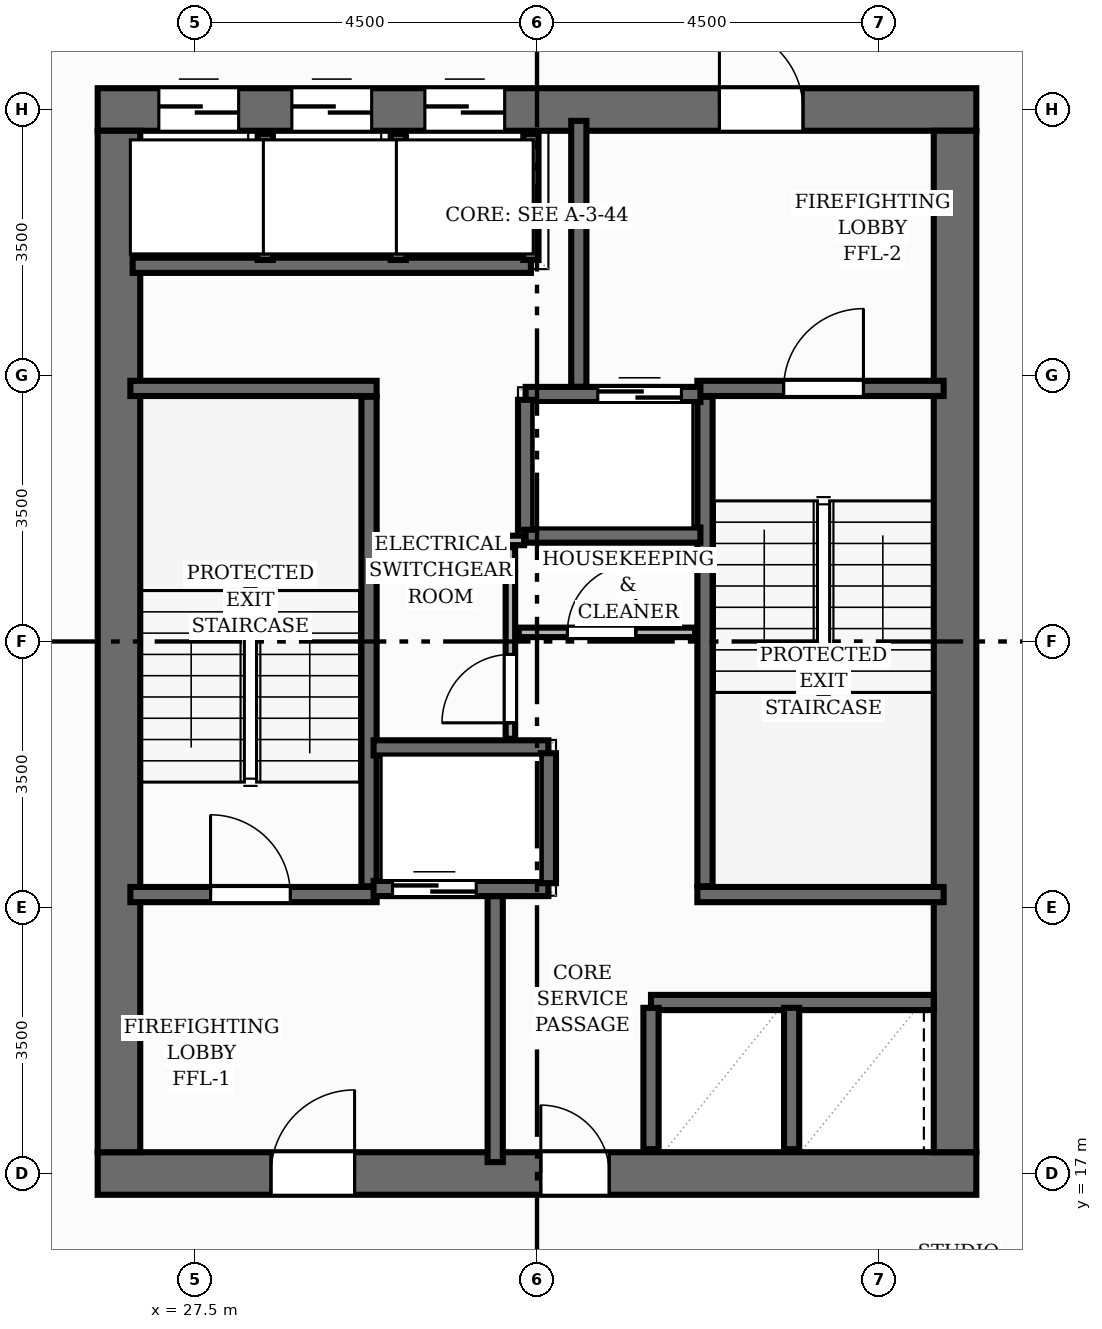
"""IFC4 building model, lengths in metres.
Left out: names, types, materials, properties, quantities, classifications, styles, units other than length and angle.
Written with IfcOpenShell. Run it as: python <this file> out.ifc"""

import sys

from ifc_helpers import new_model, si_unit, direction, frame, frame_2d, origin, place, context, subcontext, project, spatial, rectangle, extrude, element, fill, save


model = new_model("IFC4")
c1 = context("Model", 3, precision=1e-05, world=origin(), true_north=direction((0.0, 1.0)))
c2 = subcontext(c1, "Body", "Model", "MODEL_VIEW")
j1 = project(units=[si_unit("LENGTHUNIT", "METRE"), si_unit("PLANEANGLEUNIT", "RADIAN")], contexts=[c1])
p1 = place(None, origin())
s1 = spatial("IfcSite", under=j1, at=p1, CompositionType="ELEMENT")
p2 = place(p1, origin())
s2 = spatial("IfcBuilding", under=s1, at=p2, CompositionType="ELEMENT")
p3 = place(p2, frame((0.0, 0.0, 182.24)))
s3 = spatial("IfcBuildingStorey", under=s2, at=p3, CompositionType="ELEMENT", Elevation=182.24)
p4 = place(p3, frame((26.22, 17.0, 0.0), z_axis=(0.0, 0.0, 1.0), x_axis=(1.0, 0.0, 0.0)))
e1 = element("IfcWall", 1, at=p4, inside=s3, PredefinedType="SHEAR", context=c2, shape_type="SweptSolid", body=[
    extrude(rectangle(XDim=11.56, YDim=0.56, at=frame_2d((5.78, 0.0))), origin(), (0.0, 0.0, 1.0), 3.2),
])
p5 = place(p4, frame((2.28, 0.0, 0.0)))
e2 = element("IfcOpeningElement", 2, at=p5, cuts=e1, PredefinedType="OPENING", context=c2, shape_type="SweptSolid", body=[
    extrude(rectangle(XDim=1.1, YDim=2.15, at=frame_2d((0.55, 1.075))), frame((0.0, 0.29, 0.0), z_axis=(0.0, -1.0, 0.0), x_axis=(1.0, 0.0, 0.0)), (0.0, 0.0, 1.0), 0.58),
])
p6 = place(p4, frame((5.83, 0.0, 0.0)))
e3 = element("IfcOpeningElement", 3, at=p6, cuts=e1, PredefinedType="OPENING", context=c2, shape_type="SweptSolid", body=[
    extrude(rectangle(XDim=0.9, YDim=2.1, at=frame_2d((0.45, 1.05))), frame((0.0, 0.29, 0.0), z_axis=(0.0, -1.0, 0.0), x_axis=(1.0, 0.0, 0.0)), (0.0, 0.0, 1.0), 0.58),
])
p7 = place(p3, frame((26.22, 31.0, 0.0), z_axis=(0.0, 0.0, 1.0), x_axis=(1.0, 0.0, 0.0)))
e4 = element("IfcWall", 4, at=p7, inside=s3, PredefinedType="SHEAR", context=c2, shape_type="SweptSolid", body=[
    extrude(rectangle(XDim=11.56, YDim=0.56, at=frame_2d((5.78, 0.0))), origin(), (0.0, 0.0, 1.0), 3.2),
])
p8 = place(p7, frame((8.18, 0.0, 0.0)))
e5 = element("IfcOpeningElement", 5, at=p8, cuts=e4, PredefinedType="OPENING", context=c2, shape_type="SweptSolid", body=[
    extrude(rectangle(XDim=1.1, YDim=2.15, at=frame_2d((0.55, 1.075))), frame((0.0, 0.29, 0.0), z_axis=(0.0, -1.0, 0.0), x_axis=(1.0, 0.0, 0.0)), (0.0, 0.0, 1.0), 0.58),
])
p9 = place(p7, frame((0.805, 0.0, 0.0)))
e6 = element("IfcOpeningElement", 6, at=p9, cuts=e4, PredefinedType="OPENING", context=c2, shape_type="SweptSolid", body=[
    extrude(rectangle(XDim=1.05, YDim=2.15, at=frame_2d((0.525, 1.075))), frame((0.0, 0.29, 0.0), z_axis=(0.0, -1.0, 0.0), x_axis=(1.0, 0.0, 0.0)), (0.0, 0.0, 1.0), 0.58),
])
p10 = place(p7, frame((2.555, 0.0, 0.0)))
e7 = element("IfcOpeningElement", 7, at=p10, cuts=e4, PredefinedType="OPENING", context=c2, shape_type="SweptSolid", body=[
    extrude(rectangle(XDim=1.05, YDim=2.15, at=frame_2d((0.525, 1.075))), frame((0.0, 0.29, 0.0), z_axis=(0.0, -1.0, 0.0), x_axis=(1.0, 0.0, 0.0)), (0.0, 0.0, 1.0), 0.58),
])
p11 = place(p7, frame((4.305, 0.0, 0.0)))
e8 = element("IfcOpeningElement", 8, at=p11, cuts=e4, PredefinedType="OPENING", context=c2, shape_type="SweptSolid", body=[
    extrude(rectangle(XDim=1.05, YDim=2.15, at=frame_2d((0.525, 1.075))), frame((0.0, 0.29, 0.0), z_axis=(0.0, -1.0, 0.0), x_axis=(1.0, 0.0, 0.0)), (0.0, 0.0, 1.0), 0.58),
])
for number, where, z_axis, x_axis in (
    (9, (26.5, 17.28, 0.0), (0.0, 0.0, 1.0), (0.0, 1.0, 0.0)),
    (10, (37.5, 17.28, 0.0), (0.0, 0.0, 1.0), (0.0, 1.0, 0.0)),
):
    element("IfcWall", number, at=place(p3, frame(where, z_axis=z_axis, x_axis=x_axis)), inside=s3, PredefinedType="SHEAR", context=c2, shape_type="SweptSolid", body=[
        extrude(rectangle(XDim=13.44, YDim=0.56, at=frame_2d((6.72, 0.0))), origin(), (0.0, 0.0, 1.0), 3.2),
    ])
p12 = place(p3, frame((29.79, 20.78, 0.0), z_axis=(0.0, 0.0, 1.0), x_axis=(0.0, 1.0, 0.0)))
e11 = element("IfcWall", 11, at=p12, inside=s3, PredefinedType="SHEAR", context=c2, shape_type="SweptSolid", body=[
    extrude(rectangle(XDim=6.44, YDim=0.2, at=frame_2d((3.22, 0.0))), origin(), (0.0, 0.0, 1.0), 3.2),
])
p13 = place(p3, frame((26.65, 27.33, 0.0), z_axis=(0.0, 0.0, 1.0), x_axis=(1.0, 0.0, 0.0)))
e12 = element("IfcWall", 12, at=p13, inside=s3, PredefinedType="SHEAR", context=c2, shape_type="SweptSolid", body=[
    extrude(rectangle(XDim=3.24, YDim=0.2, at=frame_2d((1.62, 0.0))), origin(), (0.0, 0.0, 1.0), 3.2),
])
p14 = place(p3, frame((26.65, 20.67, 0.0), z_axis=(0.0, 0.0, 1.0), x_axis=(1.0, 0.0, 0.0)))
e13 = element("IfcWall", 13, at=p14, inside=s3, PredefinedType="SHEAR", context=c2, shape_type="SweptSolid", body=[
    extrude(rectangle(XDim=3.24, YDim=0.2, at=frame_2d((1.62, 0.0))), origin(), (0.0, 0.0, 1.0), 3.2),
])
p15 = place(p14, frame((1.055, 0.0, 0.0)))
e14 = element("IfcOpeningElement", 14, at=p15, cuts=e13, PredefinedType="OPENING", context=c2, shape_type="SweptSolid", body=[
    extrude(rectangle(XDim=1.05, YDim=2.15, at=frame_2d((0.525, 1.075))), frame((0.0, 0.11, 0.0), z_axis=(0.0, -1.0, 0.0), x_axis=(1.0, 0.0, 0.0)), (0.0, 0.0, 1.0), 0.22),
])
p16 = place(p3, frame((34.21, 20.78, 0.0), z_axis=(0.0, 0.0, 1.0), x_axis=(0.0, 1.0, 0.0)))
e15 = element("IfcWall", 15, at=p16, inside=s3, PredefinedType="SHEAR", context=c2, shape_type="SweptSolid", body=[
    extrude(rectangle(XDim=6.44, YDim=0.2, at=frame_2d((3.22, 0.0))), origin(), (0.0, 0.0, 1.0), 3.2),
])
p17 = place(p3, frame((34.11, 20.67, 0.0), z_axis=(0.0, 0.0, 1.0), x_axis=(1.0, 0.0, 0.0)))
e16 = element("IfcWall", 16, at=p17, inside=s3, PredefinedType="SHEAR", context=c2, shape_type="SweptSolid", body=[
    extrude(rectangle(XDim=3.24, YDim=0.2, at=frame_2d((1.62, 0.0))), origin(), (0.0, 0.0, 1.0), 3.2),
])
p18 = place(p3, frame((34.11, 27.33, 0.0), z_axis=(0.0, 0.0, 1.0), x_axis=(1.0, 0.0, 0.0)))
e17 = element("IfcWall", 17, at=p18, inside=s3, PredefinedType="SHEAR", context=c2, shape_type="SweptSolid", body=[
    extrude(rectangle(XDim=3.24, YDim=0.2, at=frame_2d((1.62, 0.0))), origin(), (0.0, 0.0, 1.0), 3.2),
])
p19 = place(p18, frame((1.135, 0.0, 0.0)))
e18 = element("IfcOpeningElement", 18, at=p19, cuts=e17, PredefinedType="OPENING", context=c2, shape_type="SweptSolid", body=[
    extrude(rectangle(XDim=1.05, YDim=2.15, at=frame_2d((0.525, 1.075))), frame((0.0, 0.11, 0.0), z_axis=(0.0, -1.0, 0.0), x_axis=(1.0, 0.0, 0.0)), (0.0, 0.0, 1.0), 0.22),
])
for number, where, z_axis, x_axis in (
    (19, (31.45, 17.15, 0.0), (0.0, 0.0, 1.0), (0.0, 1.0, 0.0)),
    (20, (32.55, 27.35, 0.0), (0.0, 0.0, 1.0), (0.0, 1.0, 0.0)),
):
    element("IfcWall", number, at=place(p3, frame(where, z_axis=z_axis, x_axis=x_axis)), inside=s3, PredefinedType="SHEAR", context=c2, shape_type="SweptSolid", body=[
        extrude(rectangle(XDim=3.5, YDim=0.2, at=frame_2d((1.75, 0.0))), origin(), (0.0, 0.0, 1.0), 3.2),
    ])
p20 = place(p3, frame((29.85, 20.75, 0.0), z_axis=(0.0, 0.0, 1.0), x_axis=(1.0, 0.0, 0.0)))
e21 = element("IfcWall", 21, at=p20, inside=s3, PredefinedType="SHEAR", context=c2, shape_type="SweptSolid", body=[
    extrude(rectangle(XDim=2.3, YDim=0.2, at=frame_2d((1.15, 0.0))), origin(), (0.0, 0.0, 1.0), 3.2),
])
p21 = place(p20, frame((0.25, 0.0, 0.0)))
e22 = element("IfcOpeningElement", 22, at=p21, cuts=e21, PredefinedType="OPENING", context=c2, shape_type="SweptSolid", body=[
    extrude(rectangle(XDim=1.1, YDim=2.15, at=frame_2d((0.55, 1.075))), frame((0.0, 0.11, 0.0), z_axis=(0.0, -1.0, 0.0), x_axis=(1.0, 0.0, 0.0)), (0.0, 0.0, 1.0), 0.22),
])
p22 = place(p3, frame((29.85, 22.6, 0.0), z_axis=(0.0, 0.0, 1.0), x_axis=(1.0, 0.0, 0.0)))
e23 = element("IfcWall", 23, at=p22, inside=s3, PredefinedType="SHEAR", context=c2, shape_type="SweptSolid", body=[
    extrude(rectangle(XDim=2.3, YDim=0.2, at=frame_2d((1.15, 0.0))), origin(), (0.0, 0.0, 1.0), 3.2),
])
p23 = place(p3, frame((32.15, 20.82, 0.0), z_axis=(0.0, 0.0, 1.0), x_axis=(0.0, 1.0, 0.0)))
e24 = element("IfcWall", 24, at=p23, inside=s3, PredefinedType="SHEAR", context=c2, shape_type="SweptSolid", body=[
    extrude(rectangle(XDim=1.71, YDim=0.2, at=frame_2d((0.855, 0.0))), origin(), (0.0, 0.0, 1.0), 3.2),
])
p24 = place(p3, frame((31.85, 27.25, 0.0), z_axis=(0.0, 0.0, 1.0), x_axis=(1.0, 0.0, 0.0)))
e25 = element("IfcWall", 25, at=p24, inside=s3, PredefinedType="SHEAR", context=c2, shape_type="SweptSolid", body=[
    extrude(rectangle(XDim=2.3, YDim=0.2, at=frame_2d((1.15, 0.0))), origin(), (0.0, 0.0, 1.0), 3.2),
])
p25 = place(p24, frame((0.95, 0.0, 0.0)))
e26 = element("IfcOpeningElement", 26, at=p25, cuts=e25, PredefinedType="OPENING", context=c2, shape_type="SweptSolid", body=[
    extrude(rectangle(XDim=1.1, YDim=2.15, at=frame_2d((0.55, 1.075))), frame((0.0, 0.11, 0.0), z_axis=(0.0, -1.0, 0.0), x_axis=(1.0, 0.0, 0.0)), (0.0, 0.0, 1.0), 0.22),
])
p26 = place(p3, frame((31.85, 25.4, 0.0), z_axis=(0.0, 0.0, 1.0), x_axis=(1.0, 0.0, 0.0)))
e27 = element("IfcWall", 27, at=p26, inside=s3, PredefinedType="SHEAR", context=c2, shape_type="SweptSolid", body=[
    extrude(rectangle(XDim=2.3, YDim=0.2, at=frame_2d((1.15, 0.0))), origin(), (0.0, 0.0, 1.0), 3.2),
])
p27 = place(p3, frame((31.85, 25.47, 0.0), z_axis=(0.0, 0.0, 1.0), x_axis=(0.0, 1.0, 0.0)))
e28 = element("IfcWall", 28, at=p27, inside=s3, PredefinedType="SHEAR", context=c2, shape_type="SweptSolid", body=[
    extrude(rectangle(XDim=1.71, YDim=0.2, at=frame_2d((0.855, 0.0))), origin(), (0.0, 0.0, 1.0), 3.2),
])
p28 = place(p3, frame((26.68, 28.95, 0.0), z_axis=(0.0, 0.0, 1.0), x_axis=(1.0, 0.0, 0.0)))
e29 = element("IfcWall", 29, at=p28, inside=s3, PredefinedType="SHEAR", context=c2, shape_type="SweptSolid", body=[
    extrude(rectangle(XDim=5.24, YDim=0.2, at=frame_2d((2.62, 0.0))), origin(), (0.0, 0.0, 1.0), 3.2),
])
for number, where, z_axis, x_axis in (
    (30, (31.92, 29.02, 0.0), (0.0, 0.0, 1.0), (0.0, 1.0, 0.0)),
    (31, (28.425, 29.02, 0.0), (0.0, 0.0, 1.0), (0.0, 1.0, 0.0)),
    (32, (30.175, 29.02, 0.0), (0.0, 0.0, 1.0), (0.0, 1.0, 0.0)),
):
    element("IfcWall", number, at=place(p3, frame(where, z_axis=z_axis, x_axis=x_axis)), inside=s3, PredefinedType="SHEAR", context=c2, shape_type="SweptSolid", body=[
        extrude(rectangle(XDim=1.66, YDim=0.2, at=frame_2d((0.83, 0.0))), origin(), (0.0, 0.0, 1.0), 3.2),
    ])
p29 = place(p3, frame((33.5, 19.25, 0.0), z_axis=(0.0, 0.0, 1.0), x_axis=(1.0, 0.0, 0.0)))
e33 = element("IfcWall", 33, at=p29, inside=s3, PredefinedType="SHEAR", context=c2, shape_type="SweptSolid", body=[
    extrude(rectangle(XDim=3.72, YDim=0.2, at=frame_2d((1.86, 0.0))), origin(), (0.0, 0.0, 1.0), 3.2),
])
for number, where, z_axis, x_axis in (
    (34, (33.5, 17.32, 0.0), (0.0, 0.0, 1.0), (0.0, 1.0, 0.0)),
    (35, (35.35, 17.32, 0.0), (0.0, 0.0, 1.0), (0.0, 1.0, 0.0)),
):
    element("IfcWall", number, at=place(p3, frame(where, z_axis=z_axis, x_axis=x_axis)), inside=s3, PredefinedType="SHEAR", context=c2, shape_type="SweptSolid", body=[
        extrude(rectangle(XDim=1.86, YDim=0.2, at=frame_2d((0.93, 0.0))), origin(), (0.0, 0.0, 1.0), 3.2),
    ])
p30 = place(p3, frame((31.65, 22.72, 0.0), z_axis=(0.0, 0.0, 1.0), x_axis=(0.0, 1.0, 0.0)))
e36 = element("IfcWall", 36, at=p30, inside=s3, PredefinedType="PARTITIONING", context=c2, shape_type="SweptSolid", body=[
    extrude(rectangle(XDim=2.52, YDim=0.125, at=frame_2d((1.26, 0.0))), origin(), (0.0, 0.0, 1.0), 2.955),
])
p31 = place(p30, frame((0.21, 0.0, 0.0)))
e37 = element("IfcOpeningElement", 37, at=p31, cuts=e36, PredefinedType="OPENING", context=c2, shape_type="SweptSolid", body=[
    extrude(rectangle(XDim=0.9, YDim=2.1, at=frame_2d((0.45, 1.05))), frame((0.0, 0.073, 0.0), z_axis=(0.0, -1.0, 0.0), x_axis=(1.0, 0.0, 0.0)), (0.0, 0.0, 1.0), 0.145),
])
p32 = place(p3, frame((31.76, 24.12, 0.0), z_axis=(0.0, 0.0, 1.0), x_axis=(1.0, 0.0, 0.0)))
e38 = element("IfcWall", 38, at=p32, inside=s3, PredefinedType="PARTITIONING", context=c2, shape_type="SweptSolid", body=[
    extrude(rectangle(XDim=2.32, YDim=0.125, at=frame_2d((1.16, 0.0))), origin(), (0.0, 0.0, 1.0), 2.955),
])
p33 = place(p32, frame((0.64, 0.0, 0.0)))
e39 = element("IfcOpeningElement", 39, at=p33, cuts=e38, PredefinedType="OPENING", context=c2, shape_type="SweptSolid", body=[
    extrude(rectangle(XDim=0.9, YDim=2.1, at=frame_2d((0.45, 1.05))), frame((0.0, 0.073, 0.0), z_axis=(0.0, -1.0, 0.0), x_axis=(1.0, 0.0, 0.0)), (0.0, 0.0, 1.0), 0.145),
])
p34 = place(p3, frame((29.89, 25.33, 0.0), z_axis=(0.0, 0.0, 1.0), x_axis=(1.0, 0.0, 0.0)))
e40 = element("IfcWall", 40, at=p34, inside=s3, PredefinedType="PARTITIONING", context=c2, shape_type="SweptSolid", body=[
    extrude(rectangle(XDim=1.94, YDim=0.125, at=frame_2d((0.97, 0.0))), origin(), (0.0, 0.0, 1.0), 2.955),
])
p35 = place(p15, origin())
e41 = element("IfcDoor", 41, at=p35, inside=s3, OperationType="SINGLE_SWING_LEFT", PredefinedType="DOOR", context=c2, shape_type="SweptSolid", body=[
    extrude(rectangle(XDim=1.05, YDim=2.15, at=frame_2d((0.525, 1.075))), frame((0.0, 0.025, 0.0), z_axis=(0.0, -1.0, 0.0), x_axis=(1.0, 0.0, 0.0)), (0.0, 0.0, 1.0), 0.05),
])
fill(e14, e41)
p36 = place(p19, origin())
e42 = element("IfcDoor", 42, at=p36, inside=s3, OperationType="SINGLE_SWING_RIGHT", PredefinedType="DOOR", context=c2, shape_type="SweptSolid", body=[
    extrude(rectangle(XDim=1.05, YDim=2.15, at=frame_2d((0.525, 1.075))), frame((0.0, 0.025, 0.0), z_axis=(0.0, -1.0, 0.0), x_axis=(1.0, 0.0, 0.0)), (0.0, 0.0, 1.0), 0.05),
])
fill(e18, e42)
p37 = place(p5, origin())
e43 = element("IfcDoor", 43, at=p37, inside=s3, OperationType="SINGLE_SWING_RIGHT", PredefinedType="DOOR", context=c2, shape_type="SweptSolid", body=[
    extrude(rectangle(XDim=1.1, YDim=2.15, at=frame_2d((0.55, 1.075))), frame((0.0, 0.025, 0.0), z_axis=(0.0, -1.0, 0.0), x_axis=(1.0, 0.0, 0.0)), (0.0, 0.0, 1.0), 0.05),
])
fill(e2, e43)
p38 = place(p8, origin())
e44 = element("IfcDoor", 44, at=p38, inside=s3, OperationType="SINGLE_SWING_LEFT", PredefinedType="DOOR", context=c2, shape_type="SweptSolid", body=[
    extrude(rectangle(XDim=1.1, YDim=2.15, at=frame_2d((0.55, 1.075))), frame((0.0, 0.025, 0.0), z_axis=(0.0, -1.0, 0.0), x_axis=(1.0, 0.0, 0.0)), (0.0, 0.0, 1.0), 0.05),
])
fill(e5, e44)
p39 = place(p21, origin())
e45 = element("IfcDoor", 45, at=p39, inside=s3, OperationType="DOUBLE_DOOR_SLIDING", PredefinedType="DOOR", context=c2, shape_type="SweptSolid", body=[
    extrude(rectangle(XDim=1.1, YDim=2.15, at=frame_2d((0.55, 1.075))), frame((0.0, 0.025, 0.0), z_axis=(0.0, -1.0, 0.0), x_axis=(1.0, 0.0, 0.0)), (0.0, 0.0, 1.0), 0.05),
])
fill(e22, e45)
p40 = place(p25, origin())
e46 = element("IfcDoor", 46, at=p40, inside=s3, OperationType="DOUBLE_DOOR_SLIDING", PredefinedType="DOOR", context=c2, shape_type="SweptSolid", body=[
    extrude(rectangle(XDim=1.1, YDim=2.15, at=frame_2d((0.55, 1.075))), frame((0.0, 0.025, 0.0), z_axis=(0.0, -1.0, 0.0), x_axis=(1.0, 0.0, 0.0)), (0.0, 0.0, 1.0), 0.05),
])
fill(e26, e46)
p41 = place(p9, origin())
e47 = element("IfcDoor", 47, at=p41, inside=s3, OperationType="DOUBLE_DOOR_SLIDING", PredefinedType="DOOR", context=c2, shape_type="SweptSolid", body=[
    extrude(rectangle(XDim=1.05, YDim=2.15, at=frame_2d((0.525, 1.075))), frame((0.0, 0.025, 0.0), z_axis=(0.0, -1.0, 0.0), x_axis=(1.0, 0.0, 0.0)), (0.0, 0.0, 1.0), 0.05),
])
fill(e6, e47)
p42 = place(p10, origin())
e48 = element("IfcDoor", 48, at=p42, inside=s3, OperationType="DOUBLE_DOOR_SLIDING", PredefinedType="DOOR", context=c2, shape_type="SweptSolid", body=[
    extrude(rectangle(XDim=1.05, YDim=2.15, at=frame_2d((0.525, 1.075))), frame((0.0, 0.025, 0.0), z_axis=(0.0, -1.0, 0.0), x_axis=(1.0, 0.0, 0.0)), (0.0, 0.0, 1.0), 0.05),
])
fill(e7, e48)
p43 = place(p11, origin())
e49 = element("IfcDoor", 49, at=p43, inside=s3, OperationType="DOUBLE_DOOR_SLIDING", PredefinedType="DOOR", context=c2, shape_type="SweptSolid", body=[
    extrude(rectangle(XDim=1.05, YDim=2.15, at=frame_2d((0.525, 1.075))), frame((0.0, 0.025, 0.0), z_axis=(0.0, -1.0, 0.0), x_axis=(1.0, 0.0, 0.0)), (0.0, 0.0, 1.0), 0.05),
])
fill(e8, e49)
p44 = place(p6, origin())
e50 = element("IfcDoor", 50, at=p44, inside=s3, OperationType="SINGLE_SWING_LEFT", PredefinedType="DOOR", context=c2, shape_type="SweptSolid", body=[
    extrude(rectangle(XDim=0.9, YDim=2.1, at=frame_2d((0.45, 1.05))), frame((0.0, 0.025, 0.0), z_axis=(0.0, -1.0, 0.0), x_axis=(1.0, 0.0, 0.0)), (0.0, 0.0, 1.0), 0.05),
])
fill(e3, e50)
p45 = place(p31, origin())
e51 = element("IfcDoor", 51, at=p45, inside=s3, OperationType="SINGLE_SWING_LEFT", PredefinedType="DOOR", context=c2, shape_type="SweptSolid", body=[
    extrude(rectangle(XDim=0.9, YDim=2.1, at=frame_2d((0.45, 1.05))), frame((0.0, 0.025, 0.0), z_axis=(0.0, -1.0, 0.0), x_axis=(1.0, 0.0, 0.0)), (0.0, 0.0, 1.0), 0.05),
])
fill(e37, e51)
p46 = place(p33, origin())
e52 = element("IfcDoor", 52, at=p46, inside=s3, OperationType="SINGLE_SWING_RIGHT", PredefinedType="DOOR", context=c2, shape_type="SweptSolid", body=[
    extrude(rectangle(XDim=0.9, YDim=2.1, at=frame_2d((0.45, 1.05))), frame((0.0, 0.025, 0.0), z_axis=(0.0, -1.0, 0.0), x_axis=(1.0, 0.0, 0.0)), (0.0, 0.0, 1.0), 0.05),
])
fill(e39, e52)
save(model, sys.argv[1])
